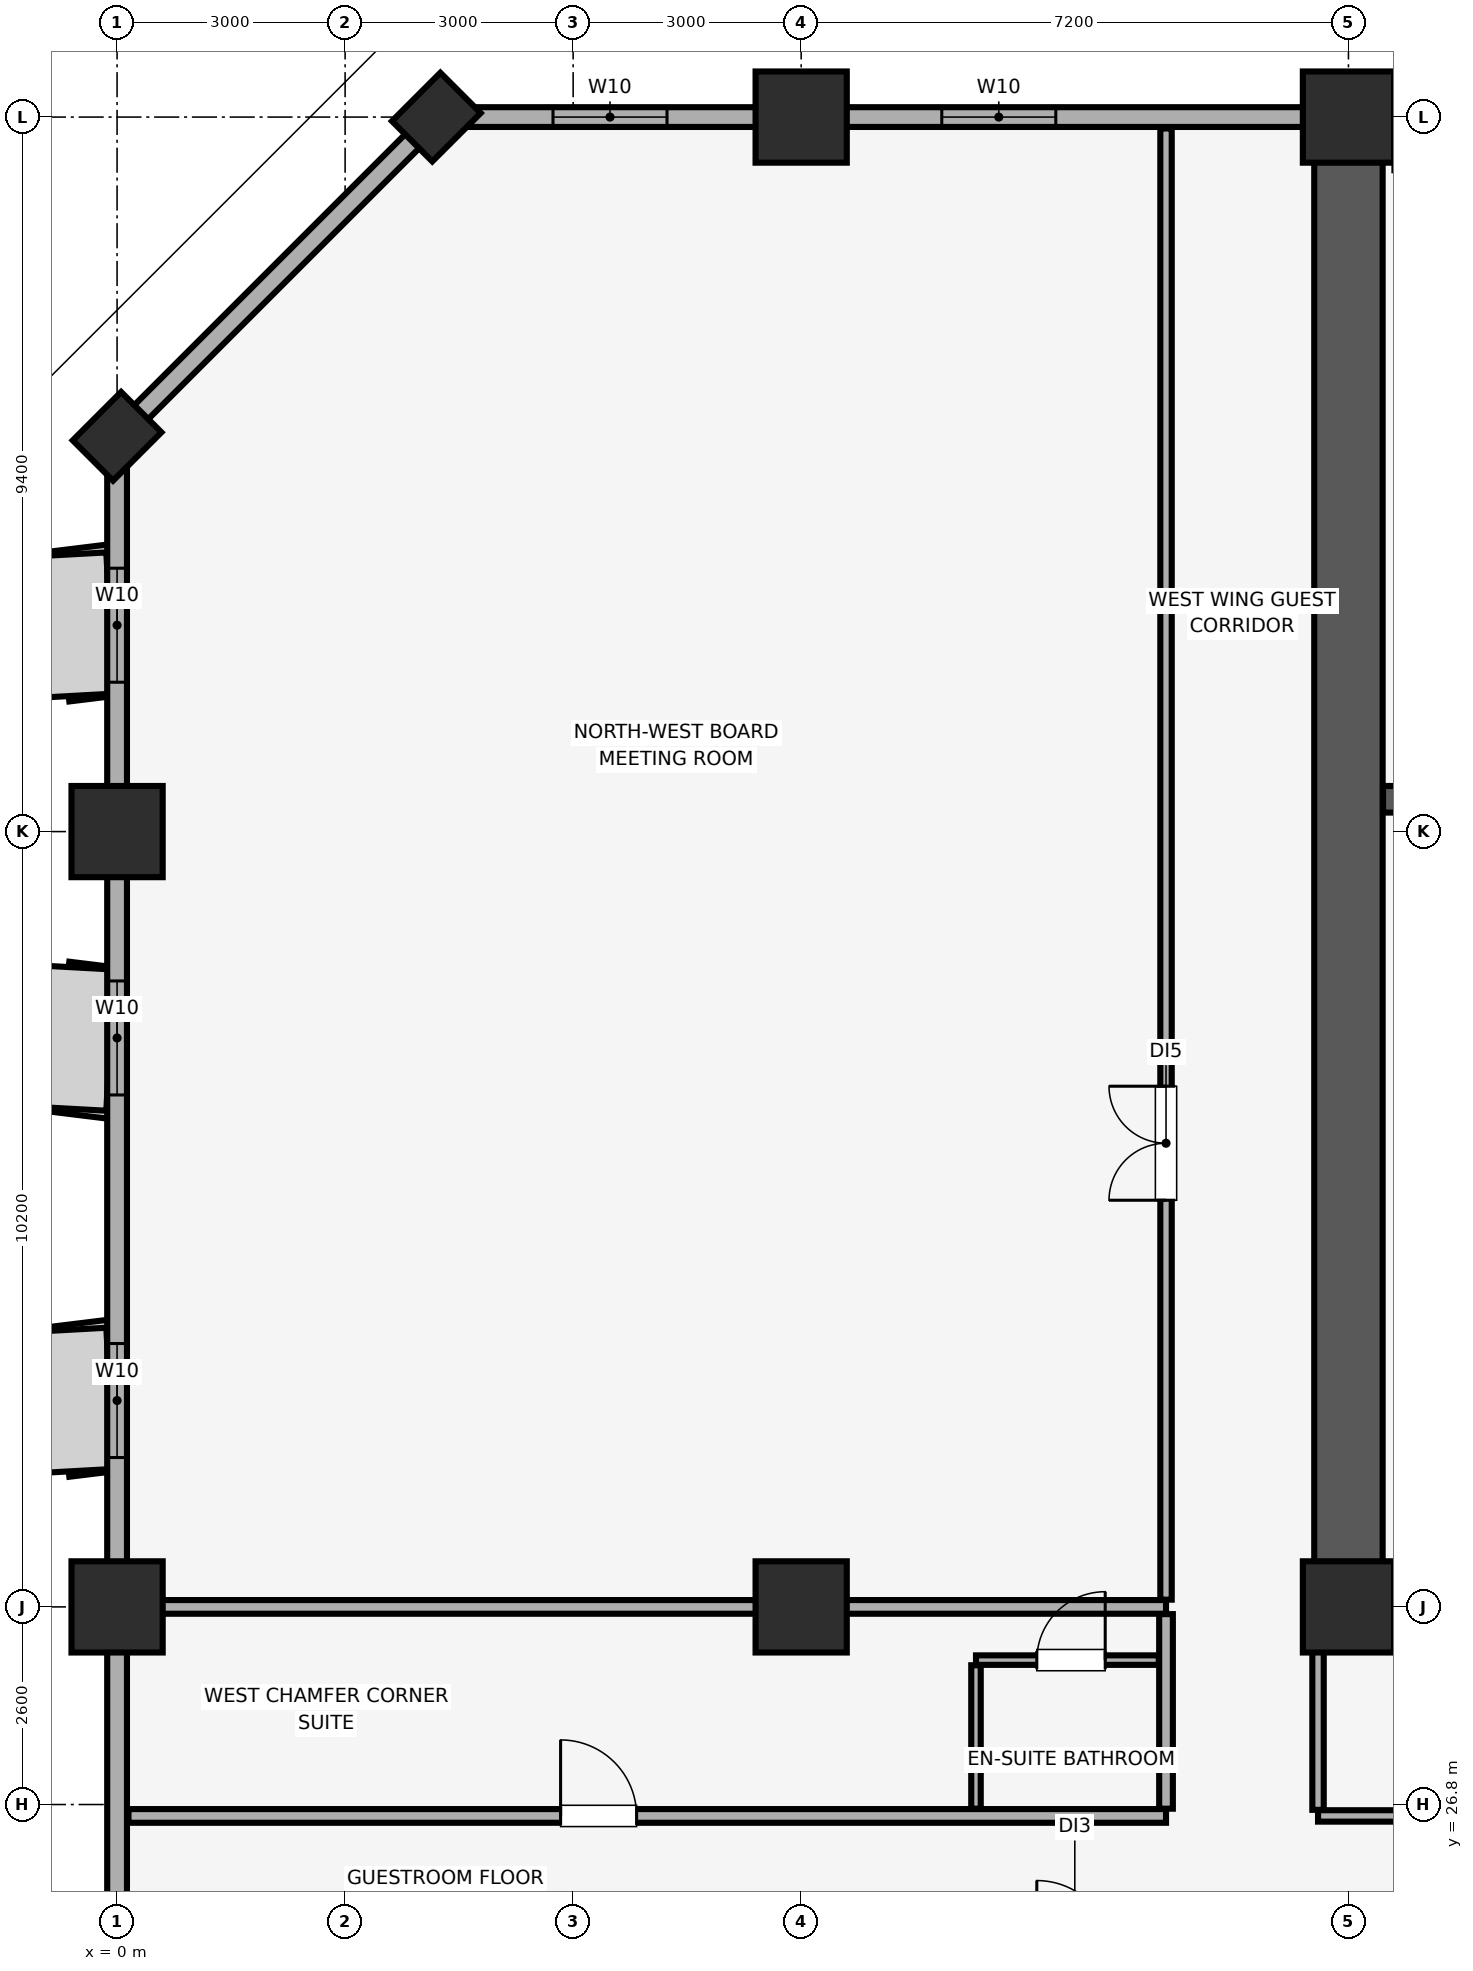
"""IFC4 building model, lengths in metres.
Left out: names, types, materials, properties, quantities, classifications, styles, units other than length and angle.
Written with IfcOpenShell. Run it as: python <this file> out.ifc"""

import sys

from ifc_helpers import new_model, si_unit, direction, frame, frame_2d, origin, origin_2d, place, context, subcontext, project, spatial, rectangle, extrude, element, fill, save


model = new_model("IFC4")
c1 = context("Model", 3, precision=1e-05, world=origin(), true_north=direction((0.0, 1.0)))
c2 = subcontext(c1, "Body", "Model", "MODEL_VIEW")
j1 = project(units=[si_unit("LENGTHUNIT", "METRE"), si_unit("PLANEANGLEUNIT", "RADIAN")], contexts=[c1])
p1 = place(None, origin())
s1 = spatial("IfcSite", under=j1, at=p1, CompositionType="ELEMENT")
p2 = place(p1, origin())
s2 = spatial("IfcBuilding", under=s1, at=p2, CompositionType="ELEMENT")
p3 = place(p2, frame((0.0, 0.0, 126.8)))
s3 = spatial("IfcBuildingStorey", under=s2, at=p3, CompositionType="ELEMENT", Elevation=126.8)
for number, where, z_axis, x_axis in (
    (1, (0.0, 29.4, 0.0), (0.0, 0.0, 1.0), (1.0, 0.0, 0.0)),
    (2, (0.0, 39.6, 0.0), (0.0, 0.0, 1.0), (1.0, 0.0, 0.0)),
):
    element("IfcColumn", number, at=place(p3, frame(where, z_axis=z_axis, x_axis=x_axis)), inside=s3, PredefinedType="COLUMN", context=c2, shape_type="SweptSolid", body=[
        extrude(rectangle(XDim=1.2, YDim=1.2, at=origin_2d()), origin(), (0.0, 0.0, 1.0), 3.51),
    ])
for number, where, z_axis, x_axis in (
    (3, (4.2, 49.0, 0.0), (0.0, 0.0, 1.0), (0.707, 0.707, 0.0)),
    (4, (0.0, 44.8, 0.0), (0.0, 0.0, 1.0), (0.707, 0.707, 0.0)),
):
    element("IfcColumn", number, at=place(p3, frame(where, z_axis=z_axis, x_axis=x_axis)), inside=s3, PredefinedType="PILASTER", context=c2, shape_type="SweptSolid", body=[
        extrude(rectangle(XDim=0.9, YDim=0.75, at=origin_2d()), origin(), (0.0, 0.0, 1.0), 3.51),
    ])
for number, where, z_axis, x_axis in (
    (5, (9.0, 29.4, 0.0), (0.0, 0.0, 1.0), (1.0, 0.0, 0.0)),
    (6, (9.0, 49.0, 0.0), (0.0, 0.0, 1.0), (1.0, 0.0, 0.0)),
    (7, (16.2, 29.4, 0.0), (0.0, 0.0, 1.0), (1.0, 0.0, 0.0)),
    (8, (16.2, 49.0, 0.0), (0.0, 0.0, 1.0), (1.0, 0.0, 0.0)),
):
    element("IfcColumn", number, at=place(p3, frame(where, z_axis=z_axis, x_axis=x_axis)), inside=s3, PredefinedType="COLUMN", context=c2, shape_type="SweptSolid", body=[
        extrude(rectangle(XDim=1.2, YDim=1.2, at=origin_2d()), origin(), (0.0, 0.0, 1.0), 3.51),
    ])
p4 = place(p3, frame((79.8, 49.0, 0.0), z_axis=(0.0, 0.0, 1.0), x_axis=(-1.0, 0.0, 0.0)))
e9 = element("IfcWall", 9, at=p4, inside=s3, PredefinedType="SOLIDWALL", context=c2, shape_type="SweptSolid", body=[
    extrude(rectangle(XDim=75.6, YDim=0.26, at=frame_2d((37.8, 0.0))), origin(), (0.0, 0.0, 1.0), 2.56),
])
p5 = place(p4, frame((72.565, 0.0, 0.85)))
e10 = element("IfcOpeningElement", 10, at=p5, cuts=e9, PredefinedType="OPENING", context=c2, shape_type="SweptSolid", body=[
    extrude(rectangle(XDim=1.5, YDim=1.4, at=frame_2d((0.75, 0.7))), frame((0.0, 0.14, 0.0), z_axis=(0.0, -1.0, 0.0), x_axis=(1.0, 0.0, 0.0)), (0.0, 0.0, 1.0), 0.28),
])
p6 = place(p4, frame((67.45, 0.0, 0.85)))
e11 = element("IfcOpeningElement", 11, at=p6, cuts=e9, PredefinedType="OPENING", context=c2, shape_type="SweptSolid", body=[
    extrude(rectangle(XDim=1.5, YDim=1.4, at=frame_2d((0.75, 0.7))), frame((0.0, 0.14, 0.0), z_axis=(0.0, -1.0, 0.0), x_axis=(1.0, 0.0, 0.0)), (0.0, 0.0, 1.0), 0.28),
])
p7 = place(p4, frame((7.6, 0.0, 0.85)))
e12 = element("IfcOpeningElement", 12, at=p7, cuts=e9, PredefinedType="OPENING", context=c2, shape_type="SweptSolid", body=[
    extrude(rectangle(XDim=1.5, YDim=1.4, at=frame_2d((0.75, 0.7))), frame((0.0, 0.14, 0.0), z_axis=(0.0, -1.0, 0.0), x_axis=(1.0, 0.0, 0.0)), (0.0, 0.0, 1.0), 0.28),
])
p8 = place(p4, frame((1.535, 0.0, 0.85)))
e13 = element("IfcOpeningElement", 13, at=p8, cuts=e9, PredefinedType="OPENING", context=c2, shape_type="SweptSolid", body=[
    extrude(rectangle(XDim=1.5, YDim=1.4, at=frame_2d((0.75, 0.7))), frame((0.0, 0.14, 0.0), z_axis=(0.0, -1.0, 0.0), x_axis=(1.0, 0.0, 0.0)), (0.0, 0.0, 1.0), 0.28),
])
p9 = place(p4, frame((52.265, 0.0, 0.9)))
e14 = element("IfcOpeningElement", 14, at=p9, cuts=e9, PredefinedType="OPENING", context=c2, shape_type="SweptSolid", body=[
    extrude(rectangle(XDim=1.5, YDim=1.4, at=frame_2d((0.75, 0.7))), frame((0.0, 0.14, 0.0), z_axis=(0.0, -1.0, 0.0), x_axis=(1.0, 0.0, 0.0)), (0.0, 0.0, 1.0), 0.28),
])
p10 = place(p4, frame((45.5, 0.0, 0.9)))
e15 = element("IfcOpeningElement", 15, at=p10, cuts=e9, PredefinedType="OPENING", context=c2, shape_type="SweptSolid", body=[
    extrude(rectangle(XDim=1.5, YDim=1.4, at=frame_2d((0.75, 0.7))), frame((0.0, 0.14, 0.0), z_axis=(0.0, -1.0, 0.0), x_axis=(1.0, 0.0, 0.0)), (0.0, 0.0, 1.0), 0.28),
])
p11 = place(p4, frame((31.05, 0.0, 0.9)))
e16 = element("IfcOpeningElement", 16, at=p11, cuts=e9, PredefinedType="OPENING", context=c2, shape_type="SweptSolid", body=[
    extrude(rectangle(XDim=1.5, YDim=1.4, at=frame_2d((0.75, 0.7))), frame((0.0, 0.14, 0.0), z_axis=(0.0, -1.0, 0.0), x_axis=(1.0, 0.0, 0.0)), (0.0, 0.0, 1.0), 0.28),
])
p12 = place(p4, frame((27.85, 0.0, 0.9)))
e17 = element("IfcOpeningElement", 17, at=p12, cuts=e9, PredefinedType="OPENING", context=c2, shape_type="SweptSolid", body=[
    extrude(rectangle(XDim=1.5, YDim=1.4, at=frame_2d((0.75, 0.7))), frame((0.0, 0.14, 0.0), z_axis=(0.0, -1.0, 0.0), x_axis=(1.0, 0.0, 0.0)), (0.0, 0.0, 1.0), 0.28),
])
p13 = place(p4, frame((23.485, 0.0, 0.9)))
e18 = element("IfcOpeningElement", 18, at=p13, cuts=e9, PredefinedType="OPENING", context=c2, shape_type="SweptSolid", body=[
    extrude(rectangle(XDim=1.5, YDim=1.4, at=frame_2d((0.75, 0.7))), frame((0.0, 0.14, 0.0), z_axis=(0.0, -1.0, 0.0), x_axis=(1.0, 0.0, 0.0)), (0.0, 0.0, 1.0), 0.28),
])
p14 = place(p3, frame((4.2, 49.0, 0.0), z_axis=(0.0, 0.0, 1.0), x_axis=(-0.707106781187, -0.707106781187, 0.0)))
e19 = element("IfcWall", 19, at=p14, inside=s3, PredefinedType="SOLIDWALL", context=c2, shape_type="SweptSolid", body=[
    extrude(rectangle(XDim=5.94, YDim=0.26, at=frame_2d((2.97, 0.0))), origin(), (0.0, 0.0, 1.0), 2.56),
])
p15 = place(p3, frame((0.0, 44.8, 0.0), z_axis=(0.0, 0.0, 1.0), x_axis=(0.0, -1.0, 0.0)))
e20 = element("IfcWall", 20, at=p15, inside=s3, PredefinedType="SOLIDWALL", context=c2, shape_type="SweptSolid", body=[
    extrude(rectangle(XDim=40.6, YDim=0.26, at=frame_2d((20.3, 0.0))), origin(), (0.0, 0.0, 1.0), 2.56),
])
p16 = place(p15, frame((33.05, 0.0, 0.85)))
e21 = element("IfcOpeningElement", 21, at=p16, cuts=e20, PredefinedType="OPENING", context=c2, shape_type="SweptSolid", body=[
    extrude(rectangle(XDim=1.5, YDim=1.4, at=frame_2d((0.75, 0.7))), frame((0.0, 0.14, 0.0), z_axis=(0.0, -1.0, 0.0), x_axis=(1.0, 0.0, 0.0)), (0.0, 0.0, 1.0), 0.28),
])
p17 = place(p15, frame((26.335, 0.0, 0.85)))
e22 = element("IfcOpeningElement", 22, at=p17, cuts=e20, PredefinedType="OPENING", context=c2, shape_type="SweptSolid", body=[
    extrude(rectangle(XDim=1.5, YDim=1.4, at=frame_2d((0.75, 0.7))), frame((0.0, 0.14, 0.0), z_axis=(0.0, -1.0, 0.0), x_axis=(1.0, 0.0, 0.0)), (0.0, 0.0, 1.0), 0.28),
])
p18 = place(p15, frame((21.565, 0.0, 0.85)))
e23 = element("IfcOpeningElement", 23, at=p18, cuts=e20, PredefinedType="OPENING", context=c2, shape_type="SweptSolid", body=[
    extrude(rectangle(XDim=1.5, YDim=1.4, at=frame_2d((0.75, 0.7))), frame((0.0, 0.14, 0.0), z_axis=(0.0, -1.0, 0.0), x_axis=(1.0, 0.0, 0.0)), (0.0, 0.0, 1.0), 0.28),
])
p19 = place(p15, frame((11.935, 0.0, 0.85)))
e24 = element("IfcOpeningElement", 24, at=p19, cuts=e20, PredefinedType="OPENING", context=c2, shape_type="SweptSolid", body=[
    extrude(rectangle(XDim=1.5, YDim=1.4, at=frame_2d((0.75, 0.7))), frame((0.0, 0.14, 0.0), z_axis=(0.0, -1.0, 0.0), x_axis=(1.0, 0.0, 0.0)), (0.0, 0.0, 1.0), 0.28),
])
p20 = place(p15, frame((7.165, 0.0, 0.85)))
e25 = element("IfcOpeningElement", 25, at=p20, cuts=e20, PredefinedType="OPENING", context=c2, shape_type="SweptSolid", body=[
    extrude(rectangle(XDim=1.5, YDim=1.4, at=frame_2d((0.75, 0.7))), frame((0.0, 0.14, 0.0), z_axis=(0.0, -1.0, 0.0), x_axis=(1.0, 0.0, 0.0)), (0.0, 0.0, 1.0), 0.28),
])
p21 = place(p15, frame((1.735, 0.0, 0.85)))
e26 = element("IfcOpeningElement", 26, at=p21, cuts=e20, PredefinedType="OPENING", context=c2, shape_type="SweptSolid", body=[
    extrude(rectangle(XDim=1.5, YDim=1.4, at=frame_2d((0.75, 0.7))), frame((0.0, 0.14, 0.0), z_axis=(0.0, -1.0, 0.0), x_axis=(1.0, 0.0, 0.0)), (0.0, 0.0, 1.0), 0.28),
])
p22 = place(p3, frame((16.2, 29.4, 0.0), z_axis=(0.0, 0.0, 1.0), x_axis=(0.0, 1.0, 0.0)))
e27 = element("IfcWall", 27, at=p22, inside=s3, PredefinedType="SHEAR", context=c2, shape_type="SweptSolid", body=[
    extrude(rectangle(XDim=19.2, YDim=0.9, at=frame_2d((9.6, 0.0))), origin(), (0.0, 0.0, 1.0), 3.51),
])
p23 = place(p3, frame((16.655, 29.4, 0.0), z_axis=(0.0, 0.0, 1.0), x_axis=(1.0, 0.0, 0.0)))
e28 = element("IfcWall", 28, at=p23, inside=s3, PredefinedType="SHEAR", context=c2, shape_type="SweptSolid", body=[
    extrude(rectangle(XDim=6.945, YDim=0.9, at=frame_2d((3.473, 0.0))), origin(), (0.0, 0.0, 1.0), 3.51),
])
p24 = place(p3, frame((16.655, 40.025, 0.0), z_axis=(0.0, 0.0, 1.0), x_axis=(1.0, 0.0, 0.0)))
e29 = element("IfcWall", 29, at=p24, inside=s3, PredefinedType="SHEAR", context=c2, shape_type="SweptSolid", body=[
    extrude(rectangle(XDim=4.2, YDim=0.35, at=frame_2d((2.1, 0.0))), origin(), (0.0, 0.0, 1.0), 3.51),
])
p25 = place(p24, frame((1.81, 0.0, 0.0)))
e30 = element("IfcOpeningElement", 30, at=p25, cuts=e29, PredefinedType="OPENING", context=c2, shape_type="SweptSolid", body=[
    extrude(rectangle(XDim=1.15, YDim=2.15, at=frame_2d((0.575, 1.075))), frame((0.0, 0.185, 0.0), z_axis=(0.0, -1.0, 0.0), x_axis=(1.0, 0.0, 0.0)), (0.0, 0.0, 1.0), 0.37),
])
p26 = place(p3, frame((15.8, 26.65, 0.0), z_axis=(0.0, 0.0, 1.0), x_axis=(1.0, 0.0, 0.0)))
e31 = element("IfcWall", 31, at=p26, inside=s3, PredefinedType="PARTITIONING", context=c2, shape_type="SweptSolid", body=[
    extrude(rectangle(XDim=9.4, YDim=0.15, at=frame_2d((4.7, 0.0))), origin(), (0.0, 0.0, 1.0), 3.51),
])
p27 = place(p26, frame((4.2, 0.0, 0.0)))
e32 = element("IfcOpeningElement", 32, at=p27, cuts=e31, PredefinedType="OPENING", context=c2, shape_type="SweptSolid", body=[
    extrude(rectangle(XDim=1.0, YDim=2.15, at=frame_2d((0.5, 1.075))), frame((0.0, 0.085, 0.0), z_axis=(0.0, -1.0, 0.0), x_axis=(1.0, 0.0, 0.0)), (0.0, 0.0, 1.0), 0.17),
])
p28 = place(p3, frame((15.8, 26.73, 0.0), z_axis=(0.0, 0.0, 1.0), x_axis=(0.0, 1.0, 0.0)))
e33 = element("IfcWall", 33, at=p28, inside=s3, PredefinedType="PARTITIONING", context=c2, shape_type="SweptSolid", body=[
    extrude(rectangle(XDim=2.66, YDim=0.15, at=frame_2d((1.33, 0.0))), origin(), (0.0, 0.0, 1.0), 3.51),
])
p29 = place(p3, frame((0.15, 26.65, 0.0), z_axis=(0.0, 0.0, 1.0), x_axis=(1.0, 0.0, 0.0)))
e34 = element("IfcWall", 34, at=p29, inside=s3, PredefinedType="PARTITIONING", context=c2, shape_type="SweptSolid", body=[
    extrude(rectangle(XDim=13.65, YDim=0.18, at=frame_2d((6.825, 0.0))), origin(), (0.0, 0.0, 1.0), 3.51),
])
p30 = place(p29, frame((5.685, 0.0, 0.0)))
e35 = element("IfcOpeningElement", 35, at=p30, cuts=e34, PredefinedType="OPENING", context=c2, shape_type="SweptSolid", body=[
    extrude(rectangle(XDim=1.0, YDim=2.15, at=frame_2d((0.5, 1.075))), frame((0.0, 0.1, 0.0), z_axis=(0.0, -1.0, 0.0), x_axis=(1.0, 0.0, 0.0)), (0.0, 0.0, 1.0), 0.2),
])
p31 = place(p3, frame((0.15, 29.4, 0.0), z_axis=(0.0, 0.0, 1.0), x_axis=(1.0, 0.0, 0.0)))
e36 = element("IfcWall", 36, at=p31, inside=s3, PredefinedType="PARTITIONING", context=c2, shape_type="SweptSolid", body=[
    extrude(rectangle(XDim=13.65, YDim=0.18, at=frame_2d((6.825, 0.0))), origin(), (0.0, 0.0, 1.0), 2.669),
])
p32 = place(p3, frame((13.8, 26.745, 0.0), z_axis=(0.0, 0.0, 1.0), x_axis=(0.0, 1.0, 0.0)))
e37 = element("IfcWall", 37, at=p32, inside=s3, PredefinedType="PARTITIONING", context=c2, shape_type="SweptSolid", body=[
    extrude(rectangle(XDim=2.56, YDim=0.18, at=frame_2d((1.28, 0.0))), origin(), (0.0, 0.0, 1.0), 3.51),
])
p33 = place(p3, frame((11.3, 28.7, 0.0), z_axis=(0.0, 0.0, 1.0), x_axis=(1.0, 0.0, 0.0)))
e38 = element("IfcWall", 38, at=p33, inside=s3, PredefinedType="PARTITIONING", context=c2, shape_type="SweptSolid", body=[
    extrude(rectangle(XDim=2.405, YDim=0.125, at=frame_2d((1.203, 0.0))), origin(), (0.0, 0.0, 1.0), 3.51),
])
p34 = place(p33, frame((0.8, 0.0, 0.0)))
e39 = element("IfcOpeningElement", 39, at=p34, cuts=e38, PredefinedType="OPENING", context=c2, shape_type="SweptSolid", body=[
    extrude(rectangle(XDim=0.9, YDim=2.1, at=frame_2d((0.45, 1.05))), frame((0.0, 0.073, 0.0), z_axis=(0.0, -1.0, 0.0), x_axis=(1.0, 0.0, 0.0)), (0.0, 0.0, 1.0), 0.145),
])
p35 = place(p3, frame((11.3, 26.745, 0.0), z_axis=(0.0, 0.0, 1.0), x_axis=(0.0, 1.0, 0.0)))
e40 = element("IfcWall", 40, at=p35, inside=s3, PredefinedType="PARTITIONING", context=c2, shape_type="SweptSolid", body=[
    extrude(rectangle(XDim=1.887, YDim=0.125, at=frame_2d((0.944, 0.0))), origin(), (0.0, 0.0, 1.0), 3.51),
])
p36 = place(p3, frame((13.8, 29.495, 0.0), z_axis=(0.0, 0.0, 1.0), x_axis=(0.0, 1.0, 0.0)))
e41 = element("IfcWall", 41, at=p36, inside=s3, PredefinedType="PARTITIONING", context=c2, shape_type="SweptSolid", body=[
    extrude(rectangle(XDim=19.355, YDim=0.15, at=frame_2d((9.677, 0.0))), origin(), (0.0, 0.0, 1.0), 3.51),
])
p37 = place(p36, frame((5.255, 0.0, 0.0)))
e42 = element("IfcOpeningElement", 42, at=p37, cuts=e41, PredefinedType="OPENING", context=c2, shape_type="SweptSolid", body=[
    extrude(rectangle(XDim=1.5, YDim=2.25, at=frame_2d((0.75, 1.125))), frame((0.0, 0.085, 0.0), z_axis=(0.0, -1.0, 0.0), x_axis=(1.0, 0.0, 0.0)), (0.0, 0.0, 1.0), 0.17),
])
p38 = place(p19, origin())
e43 = element("IfcWindow", 43, at=p38, inside=s3, PartitioningType="SINGLE_PANEL", PredefinedType="WINDOW", context=c2, shape_type="SweptSolid", body=[
    extrude(rectangle(XDim=1.5, YDim=1.4, at=frame_2d((0.75, 0.7))), frame((0.0, 0.03, 0.0), z_axis=(0.0, -1.0, 0.0), x_axis=(1.0, 0.0, 0.0)), (0.0, 0.0, 1.0), 0.06),
])
fill(e24, e43)
p39 = place(p20, origin())
e44 = element("IfcWindow", 44, at=p39, inside=s3, PartitioningType="SINGLE_PANEL", PredefinedType="WINDOW", context=c2, shape_type="SweptSolid", body=[
    extrude(rectangle(XDim=1.5, YDim=1.4, at=frame_2d((0.75, 0.7))), frame((0.0, 0.03, 0.0), z_axis=(0.0, -1.0, 0.0), x_axis=(1.0, 0.0, 0.0)), (0.0, 0.0, 1.0), 0.06),
])
fill(e25, e44)
p40 = place(p21, origin())
e45 = element("IfcWindow", 45, at=p40, inside=s3, PartitioningType="SINGLE_PANEL", PredefinedType="WINDOW", context=c2, shape_type="SweptSolid", body=[
    extrude(rectangle(XDim=1.5, YDim=1.4, at=frame_2d((0.75, 0.7))), frame((0.0, 0.03, 0.0), z_axis=(0.0, -1.0, 0.0), x_axis=(1.0, 0.0, 0.0)), (0.0, 0.0, 1.0), 0.06),
])
fill(e26, e45)
p41 = place(p5, origin())
e46 = element("IfcWindow", 46, at=p41, inside=s3, PartitioningType="SINGLE_PANEL", PredefinedType="WINDOW", context=c2, shape_type="SweptSolid", body=[
    extrude(rectangle(XDim=1.5, YDim=1.4, at=frame_2d((0.75, 0.7))), frame((0.0, 0.03, 0.0), z_axis=(0.0, -1.0, 0.0), x_axis=(1.0, 0.0, 0.0)), (0.0, 0.0, 1.0), 0.06),
])
fill(e10, e46)
p42 = place(p6, origin())
e47 = element("IfcWindow", 47, at=p42, inside=s3, PartitioningType="SINGLE_PANEL", PredefinedType="WINDOW", context=c2, shape_type="SweptSolid", body=[
    extrude(rectangle(XDim=1.5, YDim=1.4, at=frame_2d((0.75, 0.7))), frame((0.0, 0.03, 0.0), z_axis=(0.0, -1.0, 0.0), x_axis=(1.0, 0.0, 0.0)), (0.0, 0.0, 1.0), 0.06),
])
fill(e11, e47)
p43 = place(p30, origin())
e48 = element("IfcDoor", 48, at=p43, inside=s3, OperationType="SINGLE_SWING_LEFT", PredefinedType="DOOR", context=c2, shape_type="SweptSolid", body=[
    extrude(rectangle(XDim=1.0, YDim=2.15, at=frame_2d((0.5, 1.075))), frame((0.0, 0.025, 0.0), z_axis=(0.0, -1.0, 0.0), x_axis=(1.0, 0.0, 0.0)), (0.0, 0.0, 1.0), 0.05),
])
fill(e35, e48)
p44 = place(p34, origin())
e49 = element("IfcDoor", 49, at=p44, inside=s3, OperationType="SINGLE_SWING_RIGHT", PredefinedType="DOOR", context=c2, shape_type="SweptSolid", body=[
    extrude(rectangle(XDim=0.9, YDim=2.1, at=frame_2d((0.45, 1.05))), frame((0.0, 0.025, 0.0), z_axis=(0.0, -1.0, 0.0), x_axis=(1.0, 0.0, 0.0)), (0.0, 0.0, 1.0), 0.05),
])
fill(e39, e49)
p45 = place(p37, origin())
e50 = element("IfcDoor", 50, at=p45, inside=s3, OperationType="DOUBLE_DOOR_SINGLE_SWING", PredefinedType="DOOR", context=c2, shape_type="SweptSolid", body=[
    extrude(rectangle(XDim=1.5, YDim=2.25, at=frame_2d((0.75, 1.125))), frame((0.0, 0.025, 0.0), z_axis=(0.0, -1.0, 0.0), x_axis=(1.0, 0.0, 0.0)), (0.0, 0.0, 1.0), 0.05),
])
fill(e42, e50)
save(model, sys.argv[1])
